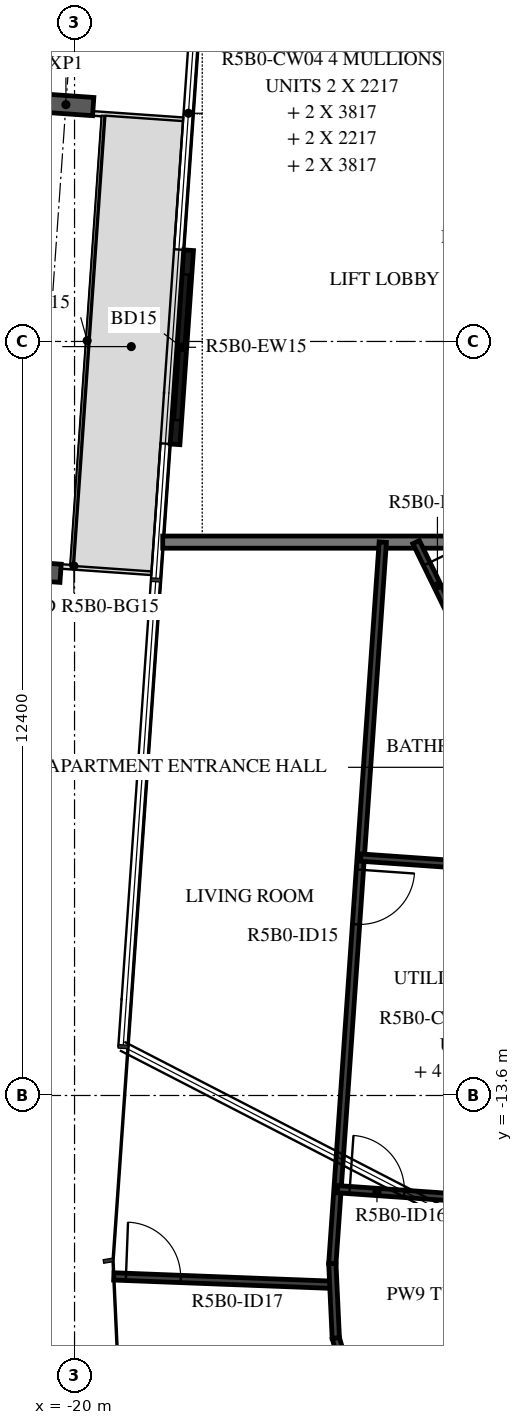
"""IFC4 building model, lengths in metres.
Left out: names, types, materials, properties, quantities, classifications, styles, units other than length and angle.
Written with IfcOpenShell. Run it as: python <this file> out.ifc"""

import sys

from ifc_helpers import new_model, si_unit, direction, frame, frame_2d, origin, origin_2d, place, context, subcontext, project, spatial, rectangle, i_section, extrude, element, fill, save


model = new_model("IFC4")
c1 = context("Model", 3, precision=1e-05, world=origin(), true_north=direction((0.0, 1.0)))
c2 = subcontext(c1, "Body", "Model", "MODEL_VIEW")
j1 = project(units=[si_unit("LENGTHUNIT", "METRE"), si_unit("PLANEANGLEUNIT", "RADIAN")], contexts=[c1])
p1 = place(None, origin())
s1 = spatial("IfcSite", under=j1, at=p1, CompositionType="ELEMENT")
p2 = place(p1, origin())
s2 = spatial("IfcBuilding", under=s1, at=p2, CompositionType="ELEMENT")
p3 = place(p2, frame((0.0, 0.0, 202.4)))
s3 = spatial("IfcBuildingStorey", under=s2, at=p3, CompositionType="ELEMENT", Elevation=202.4)
for number, where, z_axis, x_axis in (
    (1, (-20.142, 2.694, -0.38), (0.0, 0.0, 1.0), (0.07, 0.998, 0.0)),
    (2, (-20.679, -4.981, -0.38), (0.0, 0.0, 1.0), (0.07, 0.998, 0.0)),
):
    element("IfcColumn", number, at=place(p3, frame(where, z_axis=z_axis, x_axis=x_axis)), inside=s3, PredefinedType="COLUMN", context=c2, shape_type="SweptSolid", body=[
        extrude(i_section(OverallWidth=0.3, OverallDepth=0.9, WebThickness=0.019, FlangeThickness=0.035, FilletRadius=0.03, at=origin_2d()), origin(), (0.0, 0.0, 1.0), 3.5),
    ])
p4 = place(p3, frame((-18.124, 0.301, 0.0), z_axis=(0.0, 0.0, 1.0), x_axis=(-0.069728915792, -0.997565976917, 0.0)))
e3 = element("IfcWall", 3, at=p4, inside=s3, PredefinedType="STANDARD", context=c2, shape_type="SweptSolid", body=[
    extrude(rectangle(XDim=3.2, YDim=0.16, at=frame_2d((1.6, 0.0))), origin(), (0.0, 0.0, 1.0), 3.12),
])
p5 = place(p4, frame((0.4, 0.0, 0.0)))
e4 = element("IfcOpeningElement", 4, at=p5, cuts=e3, PredefinedType="OPENING", context=c2, shape_type="SweptSolid", body=[
    extrude(rectangle(XDim=2.4, YDim=2.4, at=frame_2d((1.2, 1.2))), frame((0.0, 0.09, 0.0), z_axis=(0.0, -1.0, 0.0), x_axis=(1.0, 0.0, 0.0)), (0.0, 0.0, 1.0), 0.18),
])
p6 = place(p3, frame((-18.55, -4.5, 0.0), z_axis=(0.0, 0.0, 1.0), x_axis=(1.0, 0.0, 0.0)))
e5 = element("IfcWall", 5, at=p6, inside=s3, PredefinedType="STANDARD", context=c2, shape_type="SweptSolid", body=[
    extrude(rectangle(XDim=7.438, YDim=0.2, at=frame_2d((3.719, 0.0))), origin(), (0.0, 0.0, 1.0), 3.12),
])
p7 = place(p3, frame((-14.383, -4.5, 0.0), z_axis=(0.0, 0.0, 1.0), x_axis=(0.438393414895, -0.898783185077, 0.0)))
e6 = element("IfcWall", 6, at=p7, inside=s3, PredefinedType="PARTITIONING", context=c2, shape_type="SweptSolid", body=[
    extrude(rectangle(XDim=6.049, YDim=0.12, at=frame_2d((3.024, 0.0))), origin(), (0.0, 0.0, 1.0), 3.12),
])
p8 = place(p7, frame((0.4, 0.0, 0.0)))
e7 = element("IfcOpeningElement", 7, at=p8, cuts=e6, PredefinedType="OPENING", context=c2, shape_type="SweptSolid", body=[
    extrude(rectangle(XDim=0.8, YDim=2.1, at=frame_2d((0.4, 1.05))), frame((0.0, 0.07, 0.0), z_axis=(0.0, -1.0, 0.0), x_axis=(1.0, 0.0, 0.0)), (0.0, 0.0, 1.0), 0.14),
])
p9 = place(p3, frame((-14.931, -4.5, 0.0), z_axis=(0.0, 0.0, 1.0), x_axis=(-0.069751708439, -0.997564383471, 0.0)))
e8 = element("IfcWall", 8, at=p9, inside=s3, PredefinedType="PARTITIONING", context=c2, shape_type="SweptSolid", body=[
    extrude(rectangle(XDim=11.894, YDim=0.12, at=frame_2d((5.947, 0.0))), origin(), (0.0, 0.0, 1.0), 3.12),
])
p10 = place(p9, frame((5.4, 0.0, 0.0)))
e9 = element("IfcOpeningElement", 9, at=p10, cuts=e8, PredefinedType="OPENING", context=c2, shape_type="SweptSolid", body=[
    extrude(rectangle(XDim=0.9, YDim=2.1, at=frame_2d((0.45, 1.05))), frame((0.0, 0.07, 0.0), z_axis=(0.0, -1.0, 0.0), x_axis=(1.0, 0.0, 0.0)), (0.0, 0.0, 1.0), 0.14),
])
p11 = place(p3, frame((-15.294, -9.688, 0.0), z_axis=(0.0, 0.0, 1.0), x_axis=(0.997565819809, -0.069731163391, 0.0)))
e10 = element("IfcWall", 10, at=p11, inside=s3, PredefinedType="PARTITIONING", context=c2, shape_type="SweptSolid", body=[
    extrude(rectangle(XDim=3.571, YDim=0.12, at=frame_2d((1.786, 0.0))), origin(), (0.0, 0.0, 1.0), 3.12),
])
p12 = place(p3, frame((-19.355, -16.575, 0.0), z_axis=(0.0, 0.0, 1.0), x_axis=(0.999268343647, -0.038246272823, 0.0)))
e11 = element("IfcWall", 11, at=p12, inside=s3, PredefinedType="PARTITIONING", context=c2, shape_type="SweptSolid", body=[
    extrude(rectangle(XDim=3.613, YDim=0.12, at=frame_2d((1.807, 0.0))), origin(), (0.0, 0.0, 1.0), 3.12),
])
p13 = place(p12, frame((0.2, 0.0, 0.0)))
e12 = element("IfcOpeningElement", 12, at=p13, cuts=e11, PredefinedType="OPENING", context=c2, shape_type="SweptSolid", body=[
    extrude(rectangle(XDim=0.9, YDim=2.1, at=frame_2d((0.45, 1.05))), frame((0.0, 0.07, 0.0), z_axis=(0.0, -1.0, 0.0), x_axis=(1.0, 0.0, 0.0)), (0.0, 0.0, 1.0), 0.14),
])
p14 = place(p3, frame((-15.704, -17.59, 0.0), z_axis=(0.0, 0.0, 1.0), x_axis=(-0.046364428258, 0.998924591645, 0.0)))
e13 = element("IfcWall", 13, at=p14, inside=s3, PredefinedType="PARTITIONING", context=c2, shape_type="SweptSolid", body=[
    extrude(rectangle(XDim=1.227, YDim=0.12, at=frame_2d((0.613, 0.0))), origin(), (0.0, 0.0, 1.0), 3.12),
])
p15 = place(p3, frame((-15.675, -15.141, 0.0), z_axis=(0.0, 0.0, 1.0), x_axis=(0.997563107735, -0.06976995117, 0.0)))
e14 = element("IfcWall", 14, at=p15, inside=s3, PredefinedType="PARTITIONING", context=c2, shape_type="SweptSolid", body=[
    extrude(rectangle(XDim=4.146, YDim=0.12, at=frame_2d((2.073, 0.0))), origin(), (0.0, 0.0, 1.0), 3.12),
])
p16 = place(p15, frame((0.2, 0.0, 0.0)))
e15 = element("IfcOpeningElement", 15, at=p16, cuts=e14, PredefinedType="OPENING", context=c2, shape_type="SweptSolid", body=[
    extrude(rectangle(XDim=0.9, YDim=2.1, at=frame_2d((0.45, 1.05))), frame((0.0, 0.07, 0.0), z_axis=(0.0, -1.0, 0.0), x_axis=(1.0, 0.0, 0.0)), (0.0, 0.0, 1.0), 0.14),
])
p17 = place(p3, frame((-15.424, -18.567, 0.0), z_axis=(0.0, 0.0, 1.0), x_axis=(-0.275641454312, 0.961260520704, 0.0)))
e16 = element("IfcWall", 16, at=p17, inside=s3, PredefinedType="PARTITIONING", context=c2, shape_type="SweptSolid", body=[
    extrude(rectangle(XDim=1.016, YDim=0.12, at=frame_2d((0.508, 0.0))), origin(), (0.0, 0.0, 1.0), 3.12),
])
p18 = place(p5, origin())
e17 = element("IfcDoor", 17, at=p18, inside=s3, OperationType="DOUBLE_DOOR_SLIDING", PredefinedType="DOOR", context=c2, shape_type="SweptSolid", body=[
    extrude(rectangle(XDim=2.4, YDim=2.4, at=frame_2d((1.2, 1.2))), frame((0.0, 0.025, 0.0), z_axis=(0.0, -1.0, 0.0), x_axis=(1.0, 0.0, 0.0)), (0.0, 0.0, 1.0), 0.05),
])
fill(e4, e17)
p19 = place(p8, origin())
e18 = element("IfcDoor", 18, at=p19, inside=s3, OperationType="SINGLE_SWING_RIGHT", PredefinedType="DOOR", context=c2, shape_type="SweptSolid", body=[
    extrude(rectangle(XDim=0.8, YDim=2.1, at=frame_2d((0.4, 1.05))), frame((0.0, 0.025, 0.0), z_axis=(0.0, -1.0, 0.0), x_axis=(1.0, 0.0, 0.0)), (0.0, 0.0, 1.0), 0.05),
])
fill(e7, e18)
p20 = place(p10, origin())
e19 = element("IfcDoor", 19, at=p20, inside=s3, OperationType="SINGLE_SWING_RIGHT", PredefinedType="DOOR", context=c2, shape_type="SweptSolid", body=[
    extrude(rectangle(XDim=0.9, YDim=2.1, at=frame_2d((0.45, 1.05))), frame((0.0, 0.025, 0.0), z_axis=(0.0, -1.0, 0.0), x_axis=(1.0, 0.0, 0.0)), (0.0, 0.0, 1.0), 0.05),
])
fill(e9, e19)
p21 = place(p16, origin())
e20 = element("IfcDoor", 20, at=p21, inside=s3, OperationType="SINGLE_SWING_RIGHT", PredefinedType="DOOR", context=c2, shape_type="SweptSolid", body=[
    extrude(rectangle(XDim=0.9, YDim=2.1, at=frame_2d((0.45, 1.05))), frame((0.0, 0.025, 0.0), z_axis=(0.0, -1.0, 0.0), x_axis=(1.0, 0.0, 0.0)), (0.0, 0.0, 1.0), 0.05),
])
fill(e15, e20)
p22 = place(p13, origin())
e21 = element("IfcDoor", 21, at=p22, inside=s3, OperationType="SINGLE_SWING_RIGHT", PredefinedType="DOOR", context=c2, shape_type="SweptSolid", body=[
    extrude(rectangle(XDim=0.9, YDim=2.1, at=frame_2d((0.45, 1.05))), frame((0.0, 0.025, 0.0), z_axis=(0.0, -1.0, 0.0), x_axis=(1.0, 0.0, 0.0)), (0.0, 0.0, 1.0), 0.05),
])
fill(e12, e21)
save(model, sys.argv[1])
